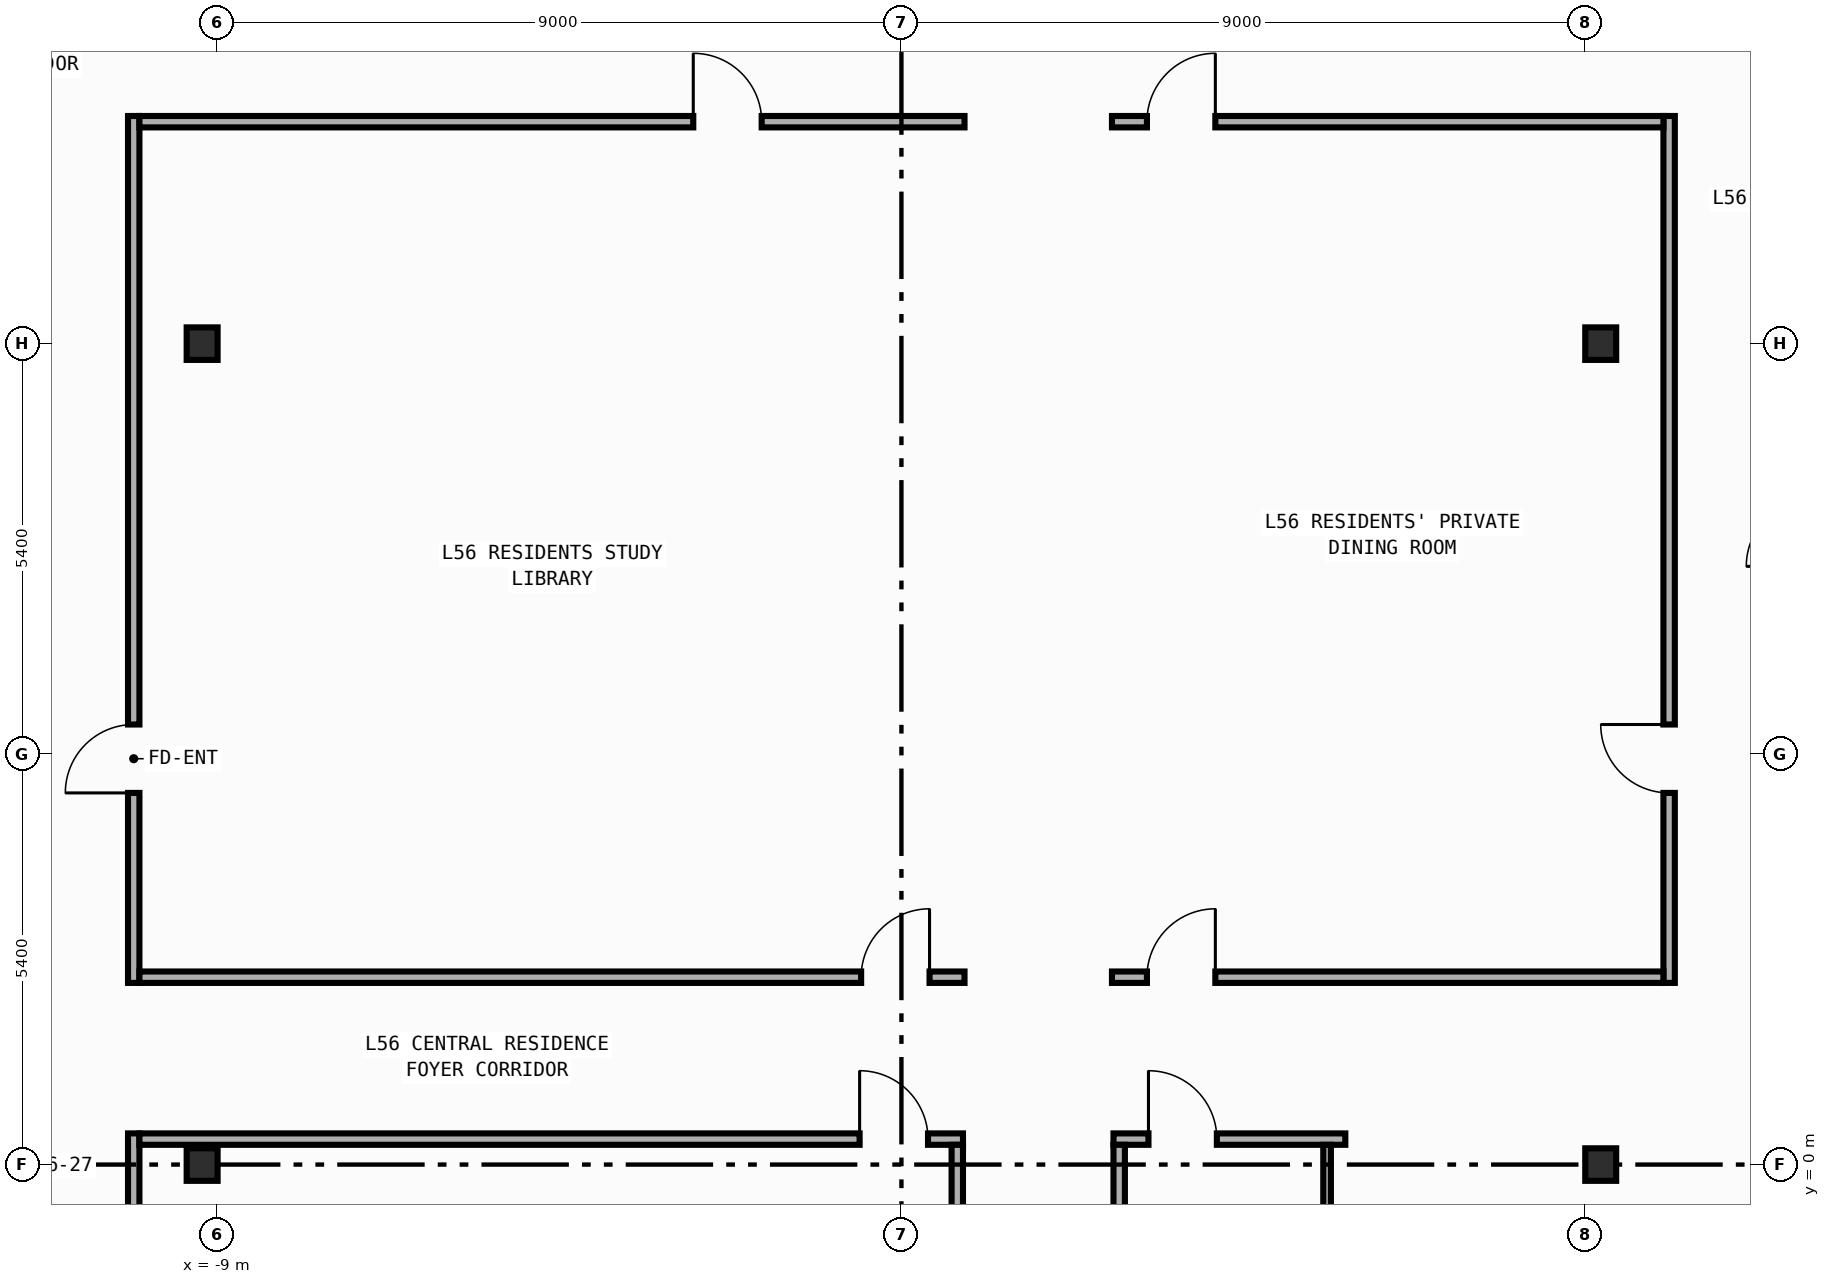
"""IFC4 building model, lengths in metres.
Left out: names, types, materials, properties, quantities, classifications, styles, units other than length and angle.
Written with IfcOpenShell. Run it as: python <this file> out.ifc"""

import sys

from ifc_helpers import new_model, si_unit, direction, frame, frame_2d, origin, origin_2d, place, context, subcontext, project, spatial, rectangle, i_section, extrude, element, fill, save


model = new_model("IFC4")
c1 = context("Model", 3, precision=1e-05, world=origin(), true_north=direction((0.0, 1.0)))
c2 = subcontext(c1, "Body", "Model", "MODEL_VIEW")
j1 = project(units=[si_unit("LENGTHUNIT", "METRE"), si_unit("PLANEANGLEUNIT", "RADIAN")], contexts=[c1])
p1 = place(None, origin())
s1 = spatial("IfcSite", under=j1, at=p1, CompositionType="ELEMENT")
p2 = place(p1, origin())
s2 = spatial("IfcBuilding", under=s1, at=p2, CompositionType="ELEMENT")
p3 = place(p2, frame((0.0, 0.0, 240.4)))
s3 = spatial("IfcBuildingStorey", under=s2, at=p3, CompositionType="ELEMENT", Elevation=240.4)
for number, where, z_axis, x_axis in (
    (1, (-9.2, 0.0, 0.0), (0.0, 0.0, 1.0), (1.0, 0.0, 0.0)),
    (2, (-9.2, 10.8, 0.0), (0.0, 0.0, 1.0), (1.0, 0.0, 0.0)),
    (3, (9.2, 0.0, 0.0), (0.0, 0.0, 1.0), (1.0, 0.0, 0.0)),
    (4, (9.2, 10.8, 0.0), (0.0, 0.0, 1.0), (1.0, 0.0, 0.0)),
):
    element("IfcColumn", number, at=place(p3, frame(where, z_axis=z_axis, x_axis=x_axis)), inside=s3, PredefinedType="COLUMN", context=c2, shape_type="SweptSolid", body=[
        extrude(i_section(OverallWidth=0.407, OverallDepth=0.428, WebThickness=0.02, FlangeThickness=0.035, FilletRadius=0.022, at=origin_2d()), origin(), (0.0, 0.0, 1.0), 3.6),
    ])
p4 = place(p3, frame((-10.1, 2.39, 0.0), z_axis=(0.0, 0.0, 1.0), x_axis=(0.0, 1.0, 0.0)))
e5 = element("IfcWall", 5, at=p4, inside=s3, PredefinedType="PARTITIONING", context=c2, shape_type="SweptSolid", body=[
    extrude(rectangle(XDim=11.405, YDim=0.15, at=frame_2d((5.703, 0.0))), origin(), (0.0, 0.0, 1.0), 3.34),
])
p5 = place(p4, frame((2.5, 0.0, 0.0)))
e6 = element("IfcOpeningElement", 6, at=p5, cuts=e5, PredefinedType="OPENING", context=c2, shape_type="SweptSolid", body=[
    extrude(rectangle(XDim=0.9, YDim=2.15, at=frame_2d((0.45, 1.075))), frame((0.0, 0.085, 0.0), z_axis=(0.0, -1.0, 0.0), x_axis=(1.0, 0.0, 0.0)), (0.0, 0.0, 1.0), 0.17),
])
p6 = place(p3, frame((-10.1, -13.795, 0.0), z_axis=(0.0, 0.0, 1.0), x_axis=(0.0, 1.0, 0.0)))
e7 = element("IfcWall", 7, at=p6, inside=s3, PredefinedType="PARTITIONING", context=c2, shape_type="SweptSolid", body=[
    extrude(rectangle(XDim=14.205, YDim=0.15, at=frame_2d((7.103, 0.0))), origin(), (0.0, 0.0, 1.0), 3.34),
])
p7 = place(p6, frame((7.972, 0.0, 0.0)))
e8 = element("IfcOpeningElement", 8, at=p7, cuts=e7, PredefinedType="OPENING", context=c2, shape_type="SweptSolid", body=[
    extrude(rectangle(XDim=0.9, YDim=2.15, at=frame_2d((0.45, 1.075))), frame((0.0, 0.085, 0.0), z_axis=(0.0, -1.0, 0.0), x_axis=(1.0, 0.0, 0.0)), (0.0, 0.0, 1.0), 0.17),
])
p8 = place(p3, frame((10.1, 2.39, 0.0), z_axis=(0.0, 0.0, 1.0), x_axis=(0.0, 1.0, 0.0)))
e9 = element("IfcWall", 9, at=p8, inside=s3, PredefinedType="PARTITIONING", context=c2, shape_type="SweptSolid", body=[
    extrude(rectangle(XDim=11.405, YDim=0.15, at=frame_2d((5.703, 0.0))), origin(), (0.0, 0.0, 1.0), 3.34),
])
p9 = place(p8, frame((2.5, 0.0, 0.0)))
e10 = element("IfcOpeningElement", 10, at=p9, cuts=e9, PredefinedType="OPENING", context=c2, shape_type="SweptSolid", body=[
    extrude(rectangle(XDim=0.9, YDim=2.15, at=frame_2d((0.45, 1.075))), frame((0.0, 0.085, 0.0), z_axis=(0.0, -1.0, 0.0), x_axis=(1.0, 0.0, 0.0)), (0.0, 0.0, 1.0), 0.17),
])
p10 = place(p3, frame((-10.025, 2.465, 0.0), z_axis=(0.0, 0.0, 1.0), x_axis=(1.0, 0.0, 0.0)))
e11 = element("IfcWall", 11, at=p10, inside=s3, PredefinedType="PARTITIONING", context=c2, shape_type="SweptSolid", body=[
    extrude(rectangle(XDim=10.855, YDim=0.15, at=frame_2d((5.427, 0.0))), origin(), (0.0, 0.0, 1.0), 3.34),
])
p11 = place(p10, frame((9.495, 0.0, 0.0)))
e12 = element("IfcOpeningElement", 12, at=p11, cuts=e11, PredefinedType="OPENING", context=c2, shape_type="SweptSolid", body=[
    extrude(rectangle(XDim=0.9, YDim=2.15, at=frame_2d((0.45, 1.075))), frame((0.0, 0.085, 0.0), z_axis=(0.0, -1.0, 0.0), x_axis=(1.0, 0.0, 0.0)), (0.0, 0.0, 1.0), 0.17),
])
p12 = place(p3, frame((-10.025, 0.335, 0.0), z_axis=(0.0, 0.0, 1.0), x_axis=(1.0, 0.0, 0.0)))
e13 = element("IfcWall", 13, at=p12, inside=s3, PredefinedType="PARTITIONING", context=c2, shape_type="SweptSolid", body=[
    extrude(rectangle(XDim=10.835, YDim=0.15, at=frame_2d((5.417, 0.0))), origin(), (0.0, 0.0, 1.0), 2.44),
])
p13 = place(p12, frame((9.475, 0.0, 0.0)))
e14 = element("IfcOpeningElement", 14, at=p13, cuts=e13, PredefinedType="OPENING", context=c2, shape_type="SweptSolid", body=[
    extrude(rectangle(XDim=0.9, YDim=2.15, at=frame_2d((0.45, 1.075))), frame((0.0, 0.085, 0.0), z_axis=(0.0, -1.0, 0.0), x_axis=(1.0, 0.0, 0.0)), (0.0, 0.0, 1.0), 0.17),
])
p14 = place(p3, frame((2.77, 2.465, 0.0), z_axis=(0.0, 0.0, 1.0), x_axis=(1.0, 0.0, 0.0)))
e15 = element("IfcWall", 15, at=p14, inside=s3, PredefinedType="PARTITIONING", context=c2, shape_type="SweptSolid", body=[
    extrude(rectangle(XDim=7.255, YDim=0.15, at=frame_2d((3.627, 0.0))), origin(), (0.0, 0.0, 1.0), 3.34),
])
p15 = place(p14, frame((0.46, 0.0, 0.0)))
e16 = element("IfcOpeningElement", 16, at=p15, cuts=e15, PredefinedType="OPENING", context=c2, shape_type="SweptSolid", body=[
    extrude(rectangle(XDim=0.9, YDim=2.15, at=frame_2d((0.45, 1.075))), frame((0.0, 0.085, 0.0), z_axis=(0.0, -1.0, 0.0), x_axis=(1.0, 0.0, 0.0)), (0.0, 0.0, 1.0), 0.17),
])
p16 = place(p3, frame((2.79, 0.335, 0.0), z_axis=(0.0, 0.0, 1.0), x_axis=(1.0, 0.0, 0.0)))
e17 = element("IfcWall", 17, at=p16, inside=s3, PredefinedType="PARTITIONING", context=c2, shape_type="SweptSolid", body=[
    extrude(rectangle(XDim=3.05, YDim=0.15, at=frame_2d((1.525, 0.0))), origin(), (0.0, 0.0, 1.0), 2.44),
])
p17 = place(p16, frame((0.46, 0.0, 0.0)))
e18 = element("IfcOpeningElement", 18, at=p17, cuts=e17, PredefinedType="OPENING", context=c2, shape_type="SweptSolid", body=[
    extrude(rectangle(XDim=0.9, YDim=2.15, at=frame_2d((0.45, 1.075))), frame((0.0, 0.085, 0.0), z_axis=(0.0, -1.0, 0.0), x_axis=(1.0, 0.0, 0.0)), (0.0, 0.0, 1.0), 0.17),
])
p18 = place(p3, frame((0.735, -13.795, 0.0), z_axis=(0.0, 0.0, 1.0), x_axis=(0.0, 1.0, 0.0)))
e19 = element("IfcWall", 19, at=p18, inside=s3, PredefinedType="PARTITIONING", context=c2, shape_type="SweptSolid", body=[
    extrude(rectangle(XDim=14.055, YDim=0.15, at=frame_2d((7.027, 0.0))), origin(), (0.0, 0.0, 1.0), 3.34),
])
p19 = place(p18, frame((7.881, 0.0, 0.0)))
e20 = element("IfcOpeningElement", 20, at=p19, cuts=e19, PredefinedType="OPENING", context=c2, shape_type="SweptSolid", body=[
    extrude(rectangle(XDim=0.9, YDim=2.15, at=frame_2d((0.45, 1.075))), frame((0.0, 0.085, 0.0), z_axis=(0.0, -1.0, 0.0), x_axis=(1.0, 0.0, 0.0)), (0.0, 0.0, 1.0), 0.17),
])
p20 = place(p3, frame((2.865, -2.38, 0.0), z_axis=(0.0, 0.0, 1.0), x_axis=(0.0, 1.0, 0.0)))
e21 = element("IfcWall", 21, at=p20, inside=s3, PredefinedType="PARTITIONING", context=c2, shape_type="SweptSolid", body=[
    extrude(rectangle(XDim=2.64, YDim=0.15, at=frame_2d((1.32, 0.0))), origin(), (0.0, 0.0, 1.0), 3.34),
])
p21 = place(p20, frame((0.46, 0.0, 0.0)))
e22 = element("IfcOpeningElement", 22, at=p21, cuts=e21, PredefinedType="OPENING", context=c2, shape_type="SweptSolid", body=[
    extrude(rectangle(XDim=0.9, YDim=2.15, at=frame_2d((0.45, 1.075))), frame((0.0, 0.085, 0.0), z_axis=(0.0, -1.0, 0.0), x_axis=(1.0, 0.0, 0.0)), (0.0, 0.0, 1.0), 0.17),
])
p22 = place(p3, frame((-10.025, 13.72, 0.0), z_axis=(0.0, 0.0, 1.0), x_axis=(1.0, 0.0, 0.0)))
e23 = element("IfcWall", 23, at=p22, inside=s3, PredefinedType="PARTITIONING", context=c2, shape_type="SweptSolid", body=[
    extrude(rectangle(XDim=10.855, YDim=0.15, at=frame_2d((5.427, 0.0))), origin(), (0.0, 0.0, 1.0), 3.34),
])
p23 = place(p22, frame((7.286, 0.0, 0.0)))
e24 = element("IfcOpeningElement", 24, at=p23, cuts=e23, PredefinedType="OPENING", context=c2, shape_type="SweptSolid", body=[
    extrude(rectangle(XDim=0.9, YDim=2.15, at=frame_2d((0.45, 1.075))), frame((0.0, 0.085, 0.0), z_axis=(0.0, -1.0, 0.0), x_axis=(1.0, 0.0, 0.0)), (0.0, 0.0, 1.0), 0.17),
])
p24 = place(p3, frame((2.77, 13.72, 0.0), z_axis=(0.0, 0.0, 1.0), x_axis=(1.0, 0.0, 0.0)))
e25 = element("IfcWall", 25, at=p24, inside=s3, PredefinedType="PARTITIONING", context=c2, shape_type="SweptSolid", body=[
    extrude(rectangle(XDim=7.255, YDim=0.15, at=frame_2d((3.627, 0.0))), origin(), (0.0, 0.0, 1.0), 3.34),
])
p25 = place(p24, frame((0.46, 0.0, 0.0)))
e26 = element("IfcOpeningElement", 26, at=p25, cuts=e25, PredefinedType="OPENING", context=c2, shape_type="SweptSolid", body=[
    extrude(rectangle(XDim=0.9, YDim=2.15, at=frame_2d((0.45, 1.075))), frame((0.0, 0.085, 0.0), z_axis=(0.0, -1.0, 0.0), x_axis=(1.0, 0.0, 0.0)), (0.0, 0.0, 1.0), 0.17),
])
p26 = place(p3, frame((5.6, 0.26, 0.0), z_axis=(0.0, 0.0, 1.0), x_axis=(0.0, -1.0, 0.0)))
e27 = element("IfcWall", 27, at=p26, inside=s3, PredefinedType="PARTITIONING", context=c2, shape_type="SweptSolid", body=[
    extrude(rectangle(XDim=2.57, YDim=0.1, at=frame_2d((1.285, 0.0))), origin(), (0.0, 0.0, 1.0), 3.34),
])
p27 = place(p5, origin())
e28 = element("IfcDoor", 28, at=p27, inside=s3, OperationType="SINGLE_SWING_LEFT", PredefinedType="DOOR", context=c2, shape_type="SweptSolid", body=[
    extrude(rectangle(XDim=0.9, YDim=2.15, at=frame_2d((0.45, 1.075))), frame((0.0, 0.025, 0.0), z_axis=(0.0, -1.0, 0.0), x_axis=(1.0, 0.0, 0.0)), (0.0, 0.0, 1.0), 0.05),
])
fill(e6, e28)
p28 = place(p9, origin())
e29 = element("IfcDoor", 29, at=p28, inside=s3, OperationType="SINGLE_SWING_RIGHT", PredefinedType="DOOR", context=c2, shape_type="SweptSolid", body=[
    extrude(rectangle(XDim=0.9, YDim=2.15, at=frame_2d((0.45, 1.075))), frame((0.0, 0.025, 0.0), z_axis=(0.0, -1.0, 0.0), x_axis=(1.0, 0.0, 0.0)), (0.0, 0.0, 1.0), 0.05),
])
fill(e10, e29)
p29 = place(p11, origin())
e30 = element("IfcDoor", 30, at=p29, inside=s3, OperationType="SINGLE_SWING_RIGHT", PredefinedType="DOOR", context=c2, shape_type="SweptSolid", body=[
    extrude(rectangle(XDim=0.9, YDim=2.15, at=frame_2d((0.45, 1.075))), frame((0.0, 0.025, 0.0), z_axis=(0.0, -1.0, 0.0), x_axis=(1.0, 0.0, 0.0)), (0.0, 0.0, 1.0), 0.05),
])
fill(e12, e30)
p30 = place(p13, origin())
e31 = element("IfcDoor", 31, at=p30, inside=s3, OperationType="SINGLE_SWING_LEFT", PredefinedType="DOOR", context=c2, shape_type="SweptSolid", body=[
    extrude(rectangle(XDim=0.9, YDim=2.15, at=frame_2d((0.45, 1.075))), frame((0.0, 0.025, 0.0), z_axis=(0.0, -1.0, 0.0), x_axis=(1.0, 0.0, 0.0)), (0.0, 0.0, 1.0), 0.05),
])
fill(e14, e31)
p31 = place(p15, origin())
e32 = element("IfcDoor", 32, at=p31, inside=s3, OperationType="SINGLE_SWING_RIGHT", PredefinedType="DOOR", context=c2, shape_type="SweptSolid", body=[
    extrude(rectangle(XDim=0.9, YDim=2.15, at=frame_2d((0.45, 1.075))), frame((0.0, 0.025, 0.0), z_axis=(0.0, -1.0, 0.0), x_axis=(1.0, 0.0, 0.0)), (0.0, 0.0, 1.0), 0.05),
])
fill(e16, e32)
p32 = place(p17, origin())
e33 = element("IfcDoor", 33, at=p32, inside=s3, OperationType="SINGLE_SWING_LEFT", PredefinedType="DOOR", context=c2, shape_type="SweptSolid", body=[
    extrude(rectangle(XDim=0.9, YDim=2.15, at=frame_2d((0.45, 1.075))), frame((0.0, 0.025, 0.0), z_axis=(0.0, -1.0, 0.0), x_axis=(1.0, 0.0, 0.0)), (0.0, 0.0, 1.0), 0.05),
])
fill(e18, e33)
p33 = place(p23, origin())
e34 = element("IfcDoor", 34, at=p33, inside=s3, OperationType="SINGLE_SWING_LEFT", PredefinedType="DOOR", context=c2, shape_type="SweptSolid", body=[
    extrude(rectangle(XDim=0.9, YDim=2.15, at=frame_2d((0.45, 1.075))), frame((0.0, 0.025, 0.0), z_axis=(0.0, -1.0, 0.0), x_axis=(1.0, 0.0, 0.0)), (0.0, 0.0, 1.0), 0.05),
])
fill(e24, e34)
p34 = place(p25, origin())
e35 = element("IfcDoor", 35, at=p34, inside=s3, OperationType="SINGLE_SWING_RIGHT", PredefinedType="DOOR", context=c2, shape_type="SweptSolid", body=[
    extrude(rectangle(XDim=0.9, YDim=2.15, at=frame_2d((0.45, 1.075))), frame((0.0, 0.025, 0.0), z_axis=(0.0, -1.0, 0.0), x_axis=(1.0, 0.0, 0.0)), (0.0, 0.0, 1.0), 0.05),
])
fill(e26, e35)
save(model, sys.argv[1])
